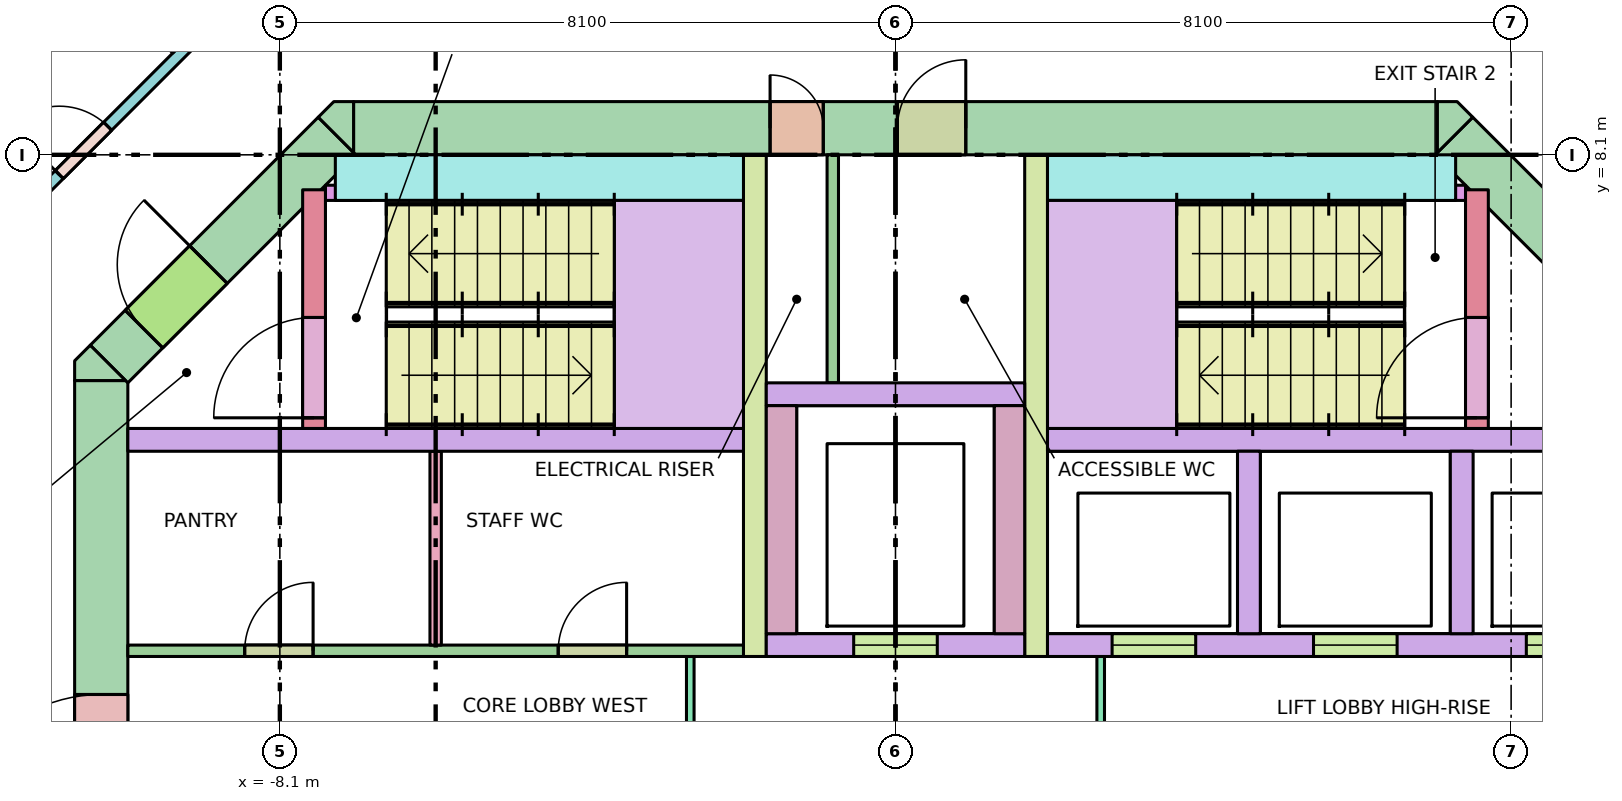
"""IFC4 building model, lengths in metres.
Left out: names, types, materials, properties, quantities, classifications, styles, units other than length and angle.
Written with IfcOpenShell. Run it as: python <this file> out.ifc"""

import sys

from ifc_helpers import new_model, si_unit, direction, frame, frame_2d, origin, place, context, subcontext, project, spatial, polyline, rectangle, outline, extrude, element, fill, save


model = new_model("IFC4")
c1 = context("Model", 3, precision=1e-05, world=origin(), true_north=direction((0.0, 1.0)))
c2 = subcontext(c1, "Body", "Model", "MODEL_VIEW")
j1 = project(units=[si_unit("LENGTHUNIT", "METRE"), si_unit("PLANEANGLEUNIT", "RADIAN")], contexts=[c1])
p1 = place(None, origin())
s1 = spatial("IfcSite", under=j1, at=p1, CompositionType="ELEMENT")
p2 = place(p1, origin())
s2 = spatial("IfcBuilding", under=s1, at=p2, CompositionType="ELEMENT")
p3 = place(p2, frame((0.0, 0.0, 154.2)))
s3 = spatial("IfcBuildingStorey", under=s2, at=p3, CompositionType="ELEMENT", Elevation=154.2)
p4 = place(p3, frame((-7.13, 8.45, -0.28), z_axis=(0.0, 0.0, 1.0), x_axis=(1.0, 0.0, 0.0)))
e1 = element("IfcWall", 1, at=p4, inside=s3, PredefinedType="SHEAR", context=c2, shape_type="SweptSolid", body=[
    extrude(rectangle(XDim=14.26, YDim=0.7, at=frame_2d((7.13, 0.0))), origin(), (0.0, 0.0, 1.0), 3.7),
])
p5 = place(p4, frame((5.48, 0.0, 0.28)))
e2 = element("IfcOpeningElement", 2, at=p5, cuts=e1, PredefinedType="OPENING", context=c2, shape_type="SweptSolid", body=[
    extrude(rectangle(XDim=0.7, YDim=2.1, at=frame_2d((0.35, 1.05))), frame((0.0, 0.36, 0.0), z_axis=(0.0, -1.0, 0.0), x_axis=(1.0, 0.0, 0.0)), (0.0, 0.0, 1.0), 0.72),
])
p6 = place(p4, frame((7.155, 0.0, 0.28)))
e3 = element("IfcOpeningElement", 3, at=p6, cuts=e1, PredefinedType="OPENING", context=c2, shape_type="SweptSolid", body=[
    extrude(rectangle(XDim=0.9, YDim=2.1, at=frame_2d((0.45, 1.05))), frame((0.0, 0.36, 0.0), z_axis=(0.0, -1.0, 0.0), x_axis=(1.0, 0.0, 0.0)), (0.0, 0.0, 1.0), 0.72),
])
p7 = place(p3, frame((-10.45, -5.13, -0.28), z_axis=(0.0, 0.0, 1.0), x_axis=(0.0, 1.0, 0.0)))
e4 = element("IfcWall", 4, at=p7, inside=s3, PredefinedType="SHEAR", context=c2, shape_type="SweptSolid", body=[
    extrude(rectangle(XDim=10.26, YDim=0.7, at=frame_2d((5.13, 0.0))), origin(), (0.0, 0.0, 1.0), 3.7),
])
p8 = place(p7, frame((4.13, 0.0, 0.28)))
e5 = element("IfcOpeningElement", 5, at=p8, cuts=e4, PredefinedType="OPENING", context=c2, shape_type="SweptSolid", body=[
    extrude(rectangle(XDim=2.0, YDim=2.1, at=frame_2d((1.0, 1.05))), frame((0.0, 0.36, 0.0), z_axis=(0.0, -1.0, 0.0), x_axis=(1.0, 0.0, 0.0)), (0.0, 0.0, 1.0), 0.72),
])
p9 = place(p3, frame((-10.347, 5.347, -0.28), z_axis=(0.0, 0.0, 1.0), x_axis=(0.707106781187, 0.707106781187, 0.0)))
e6 = element("IfcWall", 6, at=p9, inside=s3, PredefinedType="SHEAR", context=c2, shape_type="SweptSolid", body=[
    extrude(rectangle(XDim=4.243, YDim=0.7, at=frame_2d((2.121, 0.0))), origin(), (0.0, 0.0, 1.0), 3.7),
])
p10 = place(p9, frame((0.65, 0.0, 0.28)))
e7 = element("IfcOpeningElement", 7, at=p10, cuts=e6, PredefinedType="OPENING", context=c2, shape_type="SweptSolid", body=[
    extrude(rectangle(XDim=1.2, YDim=2.1, at=frame_2d((0.6, 1.05))), frame((0.0, 0.36, 0.0), z_axis=(0.0, -1.0, 0.0), x_axis=(1.0, 0.0, 0.0)), (0.0, 0.0, 1.0), 0.72),
])
p11 = place(p3, frame((7.347, 8.347, -0.28), z_axis=(0.0, 0.0, 1.0), x_axis=(0.707106781187, -0.707106781187, 0.0)))
e8 = element("IfcWall", 8, at=p11, inside=s3, PredefinedType="SHEAR", context=c2, shape_type="SweptSolid", body=[
    extrude(rectangle(XDim=4.243, YDim=0.7, at=frame_2d((2.121, 0.0))), origin(), (0.0, 0.0, 1.0), 3.7),
])
p12 = place(p11, frame((2.393, 0.0, 0.28)))
e9 = element("IfcOpeningElement", 9, at=p12, cuts=e8, PredefinedType="OPENING", context=c2, shape_type="SweptSolid", body=[
    extrude(rectangle(XDim=1.2, YDim=2.1, at=frame_2d((0.6, 1.05))), frame((0.0, 0.36, 0.0), z_axis=(0.0, -1.0, 0.0), x_axis=(1.0, 0.0, 0.0)), (0.0, 0.0, 1.0), 0.72),
])
p13 = place(p3, frame((0.0, 0.0, -0.28)))
e10 = element("IfcWall", 10, at=p13, inside=s3, PredefinedType="SHEAR", context=c2, shape_type="SweptSolid", body=[
    extrude(outline(polyline([(-10.595, 5.595), (-10.595, 5.595), (-10.595, 5.595), (-10.13, 5.13), (-10.8, 5.13), (-10.8, 5.13), (-10.8, 5.39), (-10.595, 5.595)])), origin(), (0.0, 0.0, 1.0), 3.7),
])
p14 = place(p3, frame((0.0, 0.0, -0.28)))
e11 = element("IfcWall", 11, at=p14, inside=s3, PredefinedType="SHEAR", context=c2, shape_type="SweptSolid", body=[
    extrude(outline(polyline([(-7.39, 8.8), (-7.13, 8.8), (-7.13, 8.8), (-7.13, 8.13), (-7.595, 8.595), (-7.595, 8.595), (-7.595, 8.595), (-7.39, 8.8)])), origin(), (0.0, 0.0, 1.0), 3.7),
])
p15 = place(p3, frame((0.0, 0.0, -0.28)))
e12 = element("IfcWall", 12, at=p15, inside=s3, PredefinedType="SHEAR", context=c2, shape_type="SweptSolid", body=[
    extrude(outline(polyline([(7.39, 8.8), (7.595, 8.595), (7.595, 8.595), (7.595, 8.595), (7.13, 8.13), (7.13, 8.8), (7.13, 8.8), (7.39, 8.8)])), origin(), (0.0, 0.0, 1.0), 3.7),
])
for number, where, z_axis, x_axis in (
    (13, (-10.1, 4.35, 0.0), (0.0, 0.0, 1.0), (1.0, 0.0, 0.0)),
    (14, (2.0, 4.35, 0.0), (0.0, 0.0, 1.0), (1.0, 0.0, 0.0)),
):
    element("IfcWall", number, at=place(p3, frame(where, z_axis=z_axis, x_axis=x_axis)), inside=s3, PredefinedType="SOLIDWALL", context=c2, shape_type="SweptSolid", body=[
        extrude(rectangle(XDim=8.1, YDim=0.3, at=frame_2d((4.05, 0.0))), origin(), (0.0, 0.0, 1.0), 3.42),
    ])
p16 = place(p3, frame((2.0, 1.65, 0.0), z_axis=(0.0, 0.0, 1.0), x_axis=(1.0, 0.0, 0.0)))
e15 = element("IfcWall", 15, at=p16, inside=s3, PredefinedType="SOLIDWALL", context=c2, shape_type="SweptSolid", body=[
    extrude(rectangle(XDim=8.1, YDim=0.3, at=frame_2d((4.05, 0.0))), origin(), (0.0, 0.0, 1.0), 3.42),
])
p17 = place(p16, frame((0.85, 0.0, 0.0)))
e16 = element("IfcOpeningElement", 16, at=p17, cuts=e15, PredefinedType="OPENING", context=c2, shape_type="SweptSolid", body=[
    extrude(rectangle(XDim=1.1, YDim=2.1, at=frame_2d((0.55, 1.05))), frame((0.0, 0.16, 0.0), z_axis=(0.0, -1.0, 0.0), x_axis=(1.0, 0.0, 0.0)), (0.0, 0.0, 1.0), 0.32),
])
p18 = place(p16, frame((3.5, 0.0, 0.0)))
e17 = element("IfcOpeningElement", 17, at=p18, cuts=e15, PredefinedType="OPENING", context=c2, shape_type="SweptSolid", body=[
    extrude(rectangle(XDim=1.1, YDim=2.1, at=frame_2d((0.55, 1.05))), frame((0.0, 0.16, 0.0), z_axis=(0.0, -1.0, 0.0), x_axis=(1.0, 0.0, 0.0)), (0.0, 0.0, 1.0), 0.32),
])
p19 = place(p16, frame((6.3, 0.0, 0.0)))
e18 = element("IfcOpeningElement", 18, at=p19, cuts=e15, PredefinedType="OPENING", context=c2, shape_type="SweptSolid", body=[
    extrude(rectangle(XDim=1.1, YDim=2.1, at=frame_2d((0.55, 1.05))), frame((0.0, 0.16, 0.0), z_axis=(0.0, -1.0, 0.0), x_axis=(1.0, 0.0, 0.0)), (0.0, 0.0, 1.0), 0.32),
])
for number, where, z_axis, x_axis in (
    (19, (4.65, 1.8, 0.0), (0.0, 0.0, 1.0), (0.0, 1.0, 0.0)),
    (20, (7.45, 1.8, 0.0), (0.0, 0.0, 1.0), (0.0, 1.0, 0.0)),
):
    element("IfcWall", number, at=place(p3, frame(where, z_axis=z_axis, x_axis=x_axis)), inside=s3, PredefinedType="SOLIDWALL", context=c2, shape_type="SweptSolid", body=[
        extrude(rectangle(XDim=2.4, YDim=0.3, at=frame_2d((1.2, 0.0))), origin(), (0.0, 0.0, 1.0), 3.42),
    ])
for number, where, z_axis, x_axis in (
    (21, (-1.85, 1.5, 0.0), (0.0, 0.0, 1.0), (0.0, 1.0, 0.0)),
    (22, (1.85, 1.5, 0.0), (0.0, 0.0, 1.0), (0.0, 1.0, 0.0)),
):
    element("IfcWall", number, at=place(p3, frame(where, z_axis=z_axis, x_axis=x_axis)), inside=s3, PredefinedType="SHEAR", context=c2, shape_type="SweptSolid", body=[
        extrude(rectangle(XDim=6.6, YDim=0.3, at=frame_2d((3.3, 0.0))), origin(), (0.0, 0.0, 1.0), 3.42),
    ])
p20 = place(p3, frame((-1.7, 1.65, 0.0), z_axis=(0.0, 0.0, 1.0), x_axis=(1.0, 0.0, 0.0)))
e23 = element("IfcWall", 23, at=p20, inside=s3, PredefinedType="SOLIDWALL", context=c2, shape_type="SweptSolid", body=[
    extrude(rectangle(XDim=3.4, YDim=0.3, at=frame_2d((1.7, 0.0))), origin(), (0.0, 0.0, 1.0), 3.42),
])
p21 = place(p20, frame((1.15, 0.0, 0.0)))
e24 = element("IfcOpeningElement", 24, at=p21, cuts=e23, PredefinedType="OPENING", context=c2, shape_type="SweptSolid", body=[
    extrude(rectangle(XDim=1.1, YDim=2.1, at=frame_2d((0.55, 1.05))), frame((0.0, 0.16, 0.0), z_axis=(0.0, -1.0, 0.0), x_axis=(1.0, 0.0, 0.0)), (0.0, 0.0, 1.0), 0.32),
])
for number, where, z_axis, x_axis in (
    (25, (-1.5, 1.8, 0.0), (0.0, 0.0, 1.0), (0.0, 1.0, 0.0)),
    (26, (1.5, 1.8, 0.0), (0.0, 0.0, 1.0), (0.0, 1.0, 0.0)),
):
    element("IfcWall", number, at=place(p3, frame(where, z_axis=z_axis, x_axis=x_axis)), inside=s3, PredefinedType="SOLIDWALL", context=c2, shape_type="SweptSolid", body=[
        extrude(rectangle(XDim=3.0, YDim=0.4, at=frame_2d((1.5, 0.0))), origin(), (0.0, 0.0, 1.0), 3.42),
    ])
p22 = place(p3, frame((-1.7, 4.95, 0.0), z_axis=(0.0, 0.0, 1.0), x_axis=(1.0, 0.0, 0.0)))
e27 = element("IfcWall", 27, at=p22, inside=s3, PredefinedType="SOLIDWALL", context=c2, shape_type="SweptSolid", body=[
    extrude(rectangle(XDim=3.4, YDim=0.3, at=frame_2d((1.7, 0.0))), origin(), (0.0, 0.0, 1.0), 3.42),
])
p23 = place(p3, frame((-7.65, 4.5, 0.0), z_axis=(0.0, 0.0, 1.0), x_axis=(0.0, 1.0, 0.0)))
e28 = element("IfcWall", 28, at=p23, inside=s3, PredefinedType="SHEAR", context=c2, shape_type="SweptSolid", body=[
    extrude(rectangle(XDim=3.14, YDim=0.3, at=frame_2d((1.57, 0.0))), origin(), (0.0, 0.0, 1.0), 3.42),
])
p24 = place(p23, frame((0.14, 0.0, 0.0)))
e29 = element("IfcOpeningElement", 29, at=p24, cuts=e28, PredefinedType="OPENING", context=c2, shape_type="SweptSolid", body=[
    extrude(rectangle(XDim=1.32, YDim=2.1, at=frame_2d((0.66, 1.05))), frame((0.0, 0.16, 0.0), z_axis=(0.0, -1.0, 0.0), x_axis=(1.0, 0.0, 0.0)), (0.0, 0.0, 1.0), 0.32),
])
p25 = place(p3, frame((-7.37, 7.8, 0.0), z_axis=(0.0, 0.0, 1.0), x_axis=(1.0, 0.0, 0.0)))
e30 = element("IfcWall", 30, at=p25, inside=s3, PredefinedType="SHEAR", context=c2, shape_type="SweptSolid", body=[
    extrude(rectangle(XDim=5.37, YDim=0.6, at=frame_2d((2.685, 0.0))), origin(), (0.0, 0.0, 1.0), 3.42),
])
p26 = place(p3, frame((7.65, 4.5, 0.0), z_axis=(0.0, 0.0, 1.0), x_axis=(0.0, 1.0, 0.0)))
e31 = element("IfcWall", 31, at=p26, inside=s3, PredefinedType="SHEAR", context=c2, shape_type="SweptSolid", body=[
    extrude(rectangle(XDim=3.14, YDim=0.3, at=frame_2d((1.57, 0.0))), origin(), (0.0, 0.0, 1.0), 3.42),
])
p27 = place(p26, frame((0.14, 0.0, 0.0)))
e32 = element("IfcOpeningElement", 32, at=p27, cuts=e31, PredefinedType="OPENING", context=c2, shape_type="SweptSolid", body=[
    extrude(rectangle(XDim=1.32, YDim=2.1, at=frame_2d((0.66, 1.05))), frame((0.0, 0.16, 0.0), z_axis=(0.0, -1.0, 0.0), x_axis=(1.0, 0.0, 0.0)), (0.0, 0.0, 1.0), 0.32),
])
p28 = place(p3, frame((2.0, 7.8, 0.0), z_axis=(0.0, 0.0, 1.0), x_axis=(1.0, 0.0, 0.0)))
e33 = element("IfcWall", 33, at=p28, inside=s3, PredefinedType="SHEAR", context=c2, shape_type="SweptSolid", body=[
    extrude(rectangle(XDim=5.37, YDim=0.6, at=frame_2d((2.685, 0.0))), origin(), (0.0, 0.0, 1.0), 3.42),
])
for number, where, z_axis, x_axis in (
    (34, (-7.5, 7.6, 0.0), (0.0, 0.0, 1.0), (1.0, 0.0, 0.0)),
    (35, (6.9, 7.6, 0.0), (0.0, 0.0, 1.0), (1.0, 0.0, 0.0)),
):
    element("IfcWall", number, at=place(p3, frame(where, z_axis=z_axis, x_axis=x_axis)), inside=s3, PredefinedType="SHEAR", context=c2, shape_type="SweptSolid", body=[
        extrude(rectangle(XDim=0.6, YDim=0.2, at=frame_2d((0.3, 0.0))), origin(), (0.0, 0.0, 1.0), 3.42),
    ])
p29 = place(p3, frame((-2.7, -1.5, 0.0), z_axis=(0.0, 0.0, 1.0), x_axis=(0.0, 1.0, 0.0)))
e36 = element("IfcWall", 36, at=p29, inside=s3, PredefinedType="PARTITIONING", context=c2, shape_type="SweptSolid", body=[
    extrude(rectangle(XDim=3.0, YDim=0.1, at=frame_2d((1.5, 0.0))), origin(), (0.0, 0.0, 1.0), 3.42),
])
p30 = place(p29, frame((0.9, 0.0, 0.0)))
e37 = element("IfcOpeningElement", 37, at=p30, cuts=e36, PredefinedType="OPENING", context=c2, shape_type="SweptSolid", body=[
    extrude(rectangle(XDim=1.2, YDim=2.1, at=frame_2d((0.6, 1.05))), frame((0.0, 0.06, 0.0), z_axis=(0.0, -1.0, 0.0), x_axis=(1.0, 0.0, 0.0)), (0.0, 0.0, 1.0), 0.12),
])
p31 = place(p3, frame((2.7, -1.5, 0.0), z_axis=(0.0, 0.0, 1.0), x_axis=(0.0, 1.0, 0.0)))
e38 = element("IfcWall", 38, at=p31, inside=s3, PredefinedType="PARTITIONING", context=c2, shape_type="SweptSolid", body=[
    extrude(rectangle(XDim=3.0, YDim=0.1, at=frame_2d((1.5, 0.0))), origin(), (0.0, 0.0, 1.0), 3.42),
])
p32 = place(p31, frame((0.9, 0.0, 0.0)))
e39 = element("IfcOpeningElement", 39, at=p32, cuts=e38, PredefinedType="OPENING", context=c2, shape_type="SweptSolid", body=[
    extrude(rectangle(XDim=1.2, YDim=2.1, at=frame_2d((0.6, 1.05))), frame((0.0, 0.06, 0.0), z_axis=(0.0, -1.0, 0.0), x_axis=(1.0, 0.0, 0.0)), (0.0, 0.0, 1.0), 0.12),
])
p33 = place(p3, frame((-0.825, 5.1, 0.0), z_axis=(0.0, 0.0, 1.0), x_axis=(0.0, 1.0, 0.0)))
e40 = element("IfcWall", 40, at=p33, inside=s3, PredefinedType="PARTITIONING", context=c2, shape_type="SweptSolid", body=[
    extrude(rectangle(XDim=3.0, YDim=0.15, at=frame_2d((1.5, 0.0))), origin(), (0.0, 0.0, 1.0), 3.42),
])
p34 = place(p3, frame((-6.05, 1.65, 0.0), z_axis=(0.0, 0.0, 1.0), x_axis=(0.0, 1.0, 0.0)))
e41 = element("IfcWall", 41, at=p34, inside=s3, PredefinedType="PARTITIONING", context=c2, shape_type="SweptSolid", body=[
    extrude(rectangle(XDim=2.55, YDim=0.15, at=frame_2d((1.275, 0.0))), origin(), (0.0, 0.0, 1.0), 3.42),
])
p35 = place(p3, frame((-10.1, 1.575, 0.0), z_axis=(0.0, 0.0, 1.0), x_axis=(1.0, 0.0, 0.0)))
e42 = element("IfcWall", 42, at=p35, inside=s3, PredefinedType="PARTITIONING", context=c2, shape_type="SweptSolid", body=[
    extrude(rectangle(XDim=8.1, YDim=0.15, at=frame_2d((4.05, 0.0))), origin(), (0.0, 0.0, 1.0), 3.42),
])
p36 = place(p35, frame((1.538, 0.0, 0.0)))
e43 = element("IfcOpeningElement", 43, at=p36, cuts=e42, PredefinedType="OPENING", context=c2, shape_type="SweptSolid", body=[
    extrude(rectangle(XDim=0.9, YDim=2.1, at=frame_2d((0.45, 1.05))), frame((0.0, 0.085, 0.0), z_axis=(0.0, -1.0, 0.0), x_axis=(1.0, 0.0, 0.0)), (0.0, 0.0, 1.0), 0.17),
])
p37 = place(p35, frame((5.663, 0.0, 0.0)))
e44 = element("IfcOpeningElement", 44, at=p37, cuts=e42, PredefinedType="OPENING", context=c2, shape_type="SweptSolid", body=[
    extrude(rectangle(XDim=0.9, YDim=2.1, at=frame_2d((0.45, 1.05))), frame((0.0, 0.085, 0.0), z_axis=(0.0, -1.0, 0.0), x_axis=(1.0, 0.0, 0.0)), (0.0, 0.0, 1.0), 0.17),
])
p38 = place(p3, frame((-12.638, 6.204, 0.0), z_axis=(0.0, 0.0, 1.0), x_axis=(0.707106781187, 0.707106781187, 0.0)))
e45 = element("IfcWall", 45, at=p38, inside=s3, PredefinedType="PARTITIONING", context=c2, shape_type="SweptSolid", body=[
    extrude(rectangle(XDim=6.271, YDim=0.15, at=frame_2d((3.135, 0.0))), origin(), (0.0, 0.0, 1.0), 2.62),
])
p39 = place(p38, frame((2.314, 0.0, 0.0)))
e46 = element("IfcOpeningElement", 46, at=p39, cuts=e45, PredefinedType="OPENING", context=c2, shape_type="SweptSolid", body=[
    extrude(rectangle(XDim=0.9, YDim=2.1, at=frame_2d((0.45, 1.05))), frame((0.0, 0.085, 0.0), z_axis=(0.0, -1.0, 0.0), x_axis=(1.0, 0.0, 0.0)), (0.0, 0.0, 1.0), 0.17),
])
p40 = place(p3, frame((8.204, 10.638, 0.0), z_axis=(0.0, 0.0, 1.0), x_axis=(0.707106781187, -0.707106781187, 0.0)))
e47 = element("IfcWall", 47, at=p40, inside=s3, PredefinedType="PARTITIONING", context=c2, shape_type="SweptSolid", body=[
    extrude(rectangle(XDim=6.271, YDim=0.15, at=frame_2d((3.135, 0.0))), origin(), (0.0, 0.0, 1.0), 2.62),
])
p41 = place(p40, frame((3.057, 0.0, 0.0)))
e48 = element("IfcOpeningElement", 48, at=p41, cuts=e47, PredefinedType="OPENING", context=c2, shape_type="SweptSolid", body=[
    extrude(rectangle(XDim=0.9, YDim=2.1, at=frame_2d((0.45, 1.05))), frame((0.0, 0.085, 0.0), z_axis=(0.0, -1.0, 0.0), x_axis=(1.0, 0.0, 0.0)), (0.0, 0.0, 1.0), 0.17),
])
p42 = place(p40, frame((0.436, 0.0, 0.0)))
e49 = element("IfcOpeningElement", 49, at=p42, cuts=e47, PredefinedType="OPENING", context=c2, shape_type="SweptSolid", body=[
    extrude(rectangle(XDim=0.9, YDim=2.1, at=frame_2d((0.45, 1.05))), frame((0.0, 0.085, 0.0), z_axis=(0.0, -1.0, 0.0), x_axis=(1.0, 0.0, 0.0)), (0.0, 0.0, 1.0), 0.17),
])
p43 = place(p3, frame((-9.474, 9.474, 0.0), z_axis=(0.0, 0.0, 1.0), x_axis=(-0.707106781187, 0.707106781187, 0.0)))
e50 = element("IfcWall", 50, at=p43, inside=s3, PredefinedType="PARTITIONING", context=c2, shape_type="SweptSolid", body=[
    extrude(rectangle(XDim=5.439, YDim=0.1, at=frame_2d((2.719, 0.0))), origin(), (0.0, 0.0, 1.0), 2.62),
])
p44 = place(p17, origin())
e51 = element("IfcDoor", 51, at=p44, inside=s3, OperationType="DOUBLE_DOOR_SLIDING", PredefinedType="DOOR", context=c2, shape_type="SweptSolid", body=[
    extrude(rectangle(XDim=1.1, YDim=2.1, at=frame_2d((0.55, 1.05))), frame((0.0, 0.025, 0.0), z_axis=(0.0, -1.0, 0.0), x_axis=(1.0, 0.0, 0.0)), (0.0, 0.0, 1.0), 0.05),
])
fill(e16, e51)
p45 = place(p18, origin())
e52 = element("IfcDoor", 52, at=p45, inside=s3, OperationType="DOUBLE_DOOR_SLIDING", PredefinedType="DOOR", context=c2, shape_type="SweptSolid", body=[
    extrude(rectangle(XDim=1.1, YDim=2.1, at=frame_2d((0.55, 1.05))), frame((0.0, 0.025, 0.0), z_axis=(0.0, -1.0, 0.0), x_axis=(1.0, 0.0, 0.0)), (0.0, 0.0, 1.0), 0.05),
])
fill(e17, e52)
p46 = place(p19, origin())
e53 = element("IfcDoor", 53, at=p46, inside=s3, OperationType="DOUBLE_DOOR_SLIDING", PredefinedType="DOOR", context=c2, shape_type="SweptSolid", body=[
    extrude(rectangle(XDim=1.1, YDim=2.1, at=frame_2d((0.55, 1.05))), frame((0.0, 0.025, 0.0), z_axis=(0.0, -1.0, 0.0), x_axis=(1.0, 0.0, 0.0)), (0.0, 0.0, 1.0), 0.05),
])
fill(e18, e53)
p47 = place(p21, origin())
e54 = element("IfcDoor", 54, at=p47, inside=s3, OperationType="DOUBLE_DOOR_SLIDING", PredefinedType="DOOR", context=c2, shape_type="SweptSolid", body=[
    extrude(rectangle(XDim=1.1, YDim=2.1, at=frame_2d((0.55, 1.05))), frame((0.0, 0.025, 0.0), z_axis=(0.0, -1.0, 0.0), x_axis=(1.0, 0.0, 0.0)), (0.0, 0.0, 1.0), 0.05),
])
fill(e24, e54)
p48 = place(p24, origin())
e55 = element("IfcDoor", 55, at=p48, inside=s3, OperationType="DOUBLE_DOOR_SINGLE_SWING", PredefinedType="DOOR", context=c2, shape_type="SweptSolid", body=[
    extrude(rectangle(XDim=1.32, YDim=2.1, at=frame_2d((0.66, 1.05))), frame((0.0, 0.025, 0.0), z_axis=(0.0, -1.0, 0.0), x_axis=(1.0, 0.0, 0.0)), (0.0, 0.0, 1.0), 0.05),
])
fill(e29, e55)
p49 = place(p10, origin())
e56 = element("IfcDoor", 56, at=p49, inside=s3, OperationType="SINGLE_SWING_RIGHT", PredefinedType="DOOR", context=c2, shape_type="SweptSolid", body=[
    extrude(rectangle(XDim=1.2, YDim=2.1, at=frame_2d((0.6, 1.05))), frame((0.0, 0.025, 0.0), z_axis=(0.0, -1.0, 0.0), x_axis=(1.0, 0.0, 0.0)), (0.0, 0.0, 1.0), 0.05),
])
fill(e7, e56)
p50 = place(p27, origin())
e57 = element("IfcDoor", 57, at=p50, inside=s3, OperationType="DOUBLE_DOOR_SINGLE_SWING", PredefinedType="DOOR", context=c2, shape_type="SweptSolid", body=[
    extrude(rectangle(XDim=1.32, YDim=2.1, at=frame_2d((0.66, 1.05))), frame((0.0, 0.025, 0.0), z_axis=(0.0, -1.0, 0.0), x_axis=(1.0, 0.0, 0.0)), (0.0, 0.0, 1.0), 0.05),
])
fill(e32, e57)
p51 = place(p8, origin())
e58 = element("IfcDoor", 58, at=p51, inside=s3, OperationType="DOUBLE_DOOR_SINGLE_SWING", PredefinedType="DOOR", context=c2, shape_type="SweptSolid", body=[
    extrude(rectangle(XDim=2.0, YDim=2.1, at=frame_2d((1.0, 1.05))), frame((0.0, 0.025, 0.0), z_axis=(0.0, -1.0, 0.0), x_axis=(1.0, 0.0, 0.0)), (0.0, 0.0, 1.0), 0.05),
])
fill(e5, e58)
p52 = place(p5, origin())
e59 = element("IfcDoor", 59, at=p52, inside=s3, OperationType="SINGLE_SWING_LEFT", PredefinedType="DOOR", context=c2, shape_type="SweptSolid", body=[
    extrude(rectangle(XDim=0.7, YDim=2.1, at=frame_2d((0.35, 1.05))), frame((0.0, 0.025, 0.0), z_axis=(0.0, -1.0, 0.0), x_axis=(1.0, 0.0, 0.0)), (0.0, 0.0, 1.0), 0.05),
])
fill(e2, e59)
p53 = place(p6, origin())
e60 = element("IfcDoor", 60, at=p53, inside=s3, OperationType="SINGLE_SWING_RIGHT", PredefinedType="DOOR", context=c2, shape_type="SweptSolid", body=[
    extrude(rectangle(XDim=0.9, YDim=2.1, at=frame_2d((0.45, 1.05))), frame((0.0, 0.025, 0.0), z_axis=(0.0, -1.0, 0.0), x_axis=(1.0, 0.0, 0.0)), (0.0, 0.0, 1.0), 0.05),
])
fill(e3, e60)
p54 = place(p36, origin())
e61 = element("IfcDoor", 61, at=p54, inside=s3, OperationType="SINGLE_SWING_RIGHT", PredefinedType="DOOR", context=c2, shape_type="SweptSolid", body=[
    extrude(rectangle(XDim=0.9, YDim=2.1, at=frame_2d((0.45, 1.05))), frame((0.0, 0.025, 0.0), z_axis=(0.0, -1.0, 0.0), x_axis=(1.0, 0.0, 0.0)), (0.0, 0.0, 1.0), 0.05),
])
fill(e43, e61)
p55 = place(p37, origin())
e62 = element("IfcDoor", 62, at=p55, inside=s3, OperationType="SINGLE_SWING_RIGHT", PredefinedType="DOOR", context=c2, shape_type="SweptSolid", body=[
    extrude(rectangle(XDim=0.9, YDim=2.1, at=frame_2d((0.45, 1.05))), frame((0.0, 0.025, 0.0), z_axis=(0.0, -1.0, 0.0), x_axis=(1.0, 0.0, 0.0)), (0.0, 0.0, 1.0), 0.05),
])
fill(e44, e62)
p56 = place(p39, origin())
e63 = element("IfcDoor", 63, at=p56, inside=s3, OperationType="SINGLE_SWING_LEFT", PredefinedType="DOOR", context=c2, shape_type="SweptSolid", body=[
    extrude(rectangle(XDim=0.9, YDim=2.1, at=frame_2d((0.45, 1.05))), frame((0.0, 0.025, 0.0), z_axis=(0.0, -1.0, 0.0), x_axis=(1.0, 0.0, 0.0)), (0.0, 0.0, 1.0), 0.05),
])
fill(e46, e63)
save(model, sys.argv[1])
